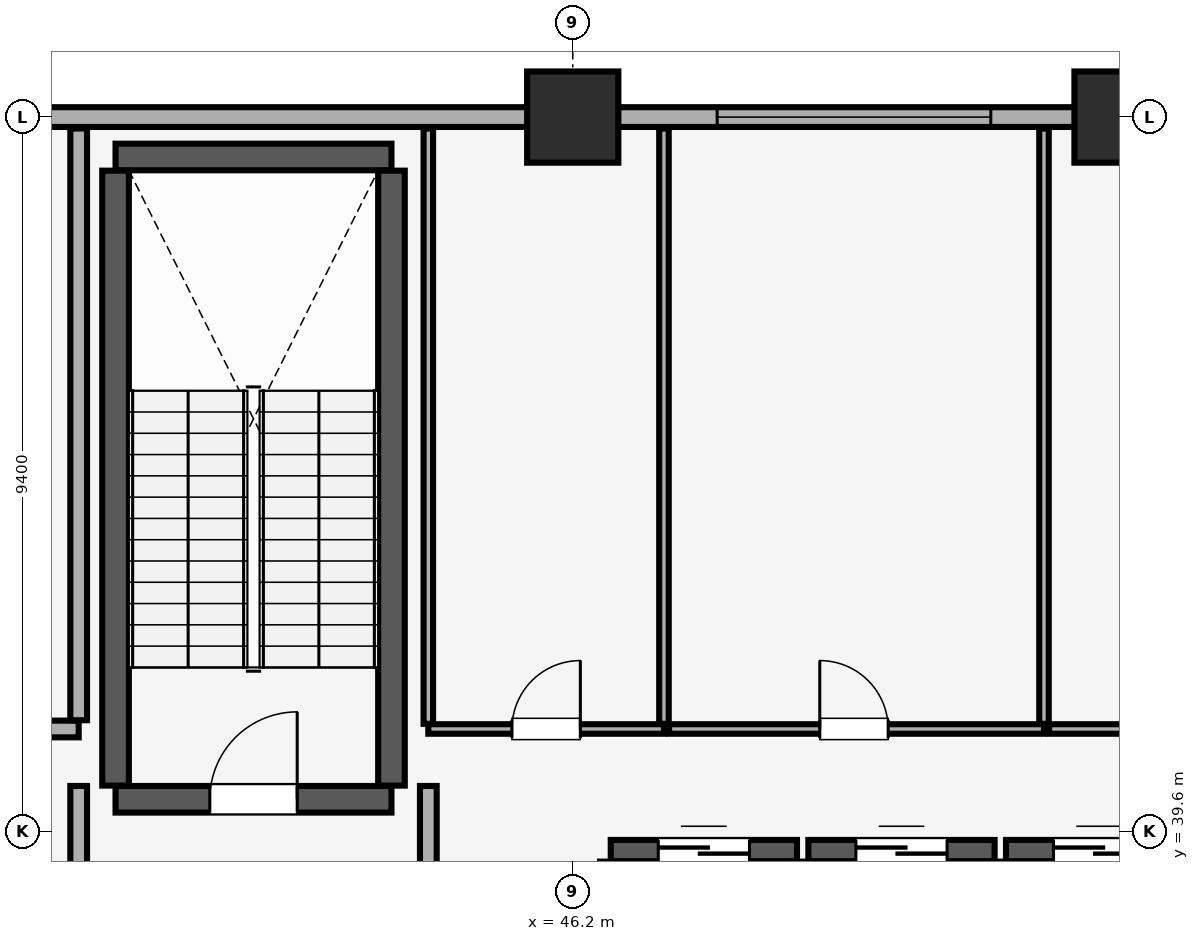
"""IFC4 building model, lengths in metres.
Left out: names, types, materials, properties, quantities, classifications, styles, units other than length and angle.
Written with IfcOpenShell. Run it as: python <this file> out.ifc"""

import sys

from ifc_helpers import new_model, si_unit, direction, frame, frame_2d, origin, origin_2d, place, context, subcontext, project, spatial, rectangle, extrude, element, fill, save


model = new_model("IFC4")
c1 = context("Model", 3, precision=1e-05, world=origin(), true_north=direction((0.0, 1.0)))
c2 = subcontext(c1, "Body", "Model", "MODEL_VIEW")
j1 = project(units=[si_unit("LENGTHUNIT", "METRE"), si_unit("PLANEANGLEUNIT", "RADIAN")], contexts=[c1])
p1 = place(None, origin())
s1 = spatial("IfcSite", under=j1, at=p1, CompositionType="ELEMENT")
p2 = place(p1, origin())
s2 = spatial("IfcBuilding", under=s1, at=p2, CompositionType="ELEMENT")
p3 = place(p2, frame((0.0, 0.0, 130.55)))
s3 = spatial("IfcBuildingStorey", under=s2, at=p3, CompositionType="ELEMENT", Elevation=130.55)
for number, where, z_axis, x_axis in (
    (1, (46.2, 49.0, 0.0), (0.0, 0.0, 1.0), (1.0, 0.0, 0.0)),
    (2, (53.4, 49.0, 0.0), (0.0, 0.0, 1.0), (1.0, 0.0, 0.0)),
):
    element("IfcColumn", number, at=place(p3, frame(where, z_axis=z_axis, x_axis=x_axis)), inside=s3, PredefinedType="COLUMN", context=c2, shape_type="SweptSolid", body=[
        extrude(rectangle(XDim=1.2, YDim=1.2, at=origin_2d()), origin(), (0.0, 0.0, 1.0), 4.56),
    ])
p4 = place(p3, frame((79.8, 49.0, 0.0), z_axis=(0.0, 0.0, 1.0), x_axis=(-1.0, 0.0, 0.0)))
e3 = element("IfcWall", 3, at=p4, inside=s3, PredefinedType="SOLIDWALL", context=c2, shape_type="SweptSolid", body=[
    extrude(rectangle(XDim=75.6, YDim=0.26, at=frame_2d((37.8, 0.0))), origin(), (0.0, 0.0, 1.0), 3.4),
])
p5 = place(p4, frame((71.815, 0.0, 0.85)))
e4 = element("IfcOpeningElement", 4, at=p5, cuts=e3, PredefinedType="OPENING", context=c2, shape_type="SweptSolid", body=[
    extrude(rectangle(XDim=3.0, YDim=1.5, at=frame_2d((1.5, 0.75))), frame((0.0, 0.14, 0.0), z_axis=(0.0, -1.0, 0.0), x_axis=(1.0, 0.0, 0.0)), (0.0, 0.0, 1.0), 0.28),
])
p6 = place(p4, frame((65.775, 0.0, 0.85)))
e5 = element("IfcOpeningElement", 5, at=p6, cuts=e3, PredefinedType="OPENING", context=c2, shape_type="SweptSolid", body=[
    extrude(rectangle(XDim=3.0, YDim=1.5, at=frame_2d((1.5, 0.75))), frame((0.0, 0.14, 0.0), z_axis=(0.0, -1.0, 0.0), x_axis=(1.0, 0.0, 0.0)), (0.0, 0.0, 1.0), 0.28),
])
p7 = place(p4, frame((6.825, 0.0, 0.85)))
e6 = element("IfcOpeningElement", 6, at=p7, cuts=e3, PredefinedType="OPENING", context=c2, shape_type="SweptSolid", body=[
    extrude(rectangle(XDim=3.0, YDim=1.5, at=frame_2d((1.5, 0.75))), frame((0.0, 0.14, 0.0), z_axis=(0.0, -1.0, 0.0), x_axis=(1.0, 0.0, 0.0)), (0.0, 0.0, 1.0), 0.28),
])
p8 = place(p4, frame((0.785, 0.0, 0.85)))
e7 = element("IfcOpeningElement", 7, at=p8, cuts=e3, PredefinedType="OPENING", context=c2, shape_type="SweptSolid", body=[
    extrude(rectangle(XDim=3.0, YDim=1.5, at=frame_2d((1.5, 0.75))), frame((0.0, 0.14, 0.0), z_axis=(0.0, -1.0, 0.0), x_axis=(1.0, 0.0, 0.0)), (0.0, 0.0, 1.0), 0.28),
])
p9 = place(p4, frame((50.315, 0.0, 0.9)))
e8 = element("IfcOpeningElement", 8, at=p9, cuts=e3, PredefinedType="OPENING", context=c2, shape_type="SweptSolid", body=[
    extrude(rectangle(XDim=3.6, YDim=1.5, at=frame_2d((1.8, 0.75))), frame((0.0, 0.14, 0.0), z_axis=(0.0, -1.0, 0.0), x_axis=(1.0, 0.0, 0.0)), (0.0, 0.0, 1.0), 0.28),
])
p10 = place(p4, frame((45.25, 0.0, 0.9)))
e9 = element("IfcOpeningElement", 9, at=p10, cuts=e3, PredefinedType="OPENING", context=c2, shape_type="SweptSolid", body=[
    extrude(rectangle(XDim=3.0, YDim=1.5, at=frame_2d((1.5, 0.75))), frame((0.0, 0.14, 0.0), z_axis=(0.0, -1.0, 0.0), x_axis=(1.0, 0.0, 0.0)), (0.0, 0.0, 1.0), 0.28),
])
p11 = place(p4, frame((28.1, 0.0, 0.9)))
e10 = element("IfcOpeningElement", 10, at=p11, cuts=e3, PredefinedType="OPENING", context=c2, shape_type="SweptSolid", body=[
    extrude(rectangle(XDim=3.6, YDim=1.5, at=frame_2d((1.8, 0.75))), frame((0.0, 0.14, 0.0), z_axis=(0.0, -1.0, 0.0), x_axis=(1.0, 0.0, 0.0)), (0.0, 0.0, 1.0), 0.28),
])
p12 = place(p4, frame((23.035, 0.0, 0.9)))
e11 = element("IfcOpeningElement", 11, at=p12, cuts=e3, PredefinedType="OPENING", context=c2, shape_type="SweptSolid", body=[
    extrude(rectangle(XDim=2.4, YDim=1.5, at=frame_2d((1.2, 0.75))), frame((0.0, 0.14, 0.0), z_axis=(0.0, -1.0, 0.0), x_axis=(1.0, 0.0, 0.0)), (0.0, 0.0, 1.0), 0.28),
])
p13 = place(p3, frame((40.185, 40.025, 0.0), z_axis=(0.0, 0.0, 1.0), x_axis=(1.0, 0.0, 0.0)))
e12 = element("IfcWall", 12, at=p13, inside=s3, PredefinedType="SHEAR", context=c2, shape_type="SweptSolid", body=[
    extrude(rectangle(XDim=3.63, YDim=0.35, at=frame_2d((1.815, 0.0))), origin(), (0.0, 0.0, 1.0), 4.52),
])
p14 = place(p13, frame((1.24, 0.0, 0.0)))
e13 = element("IfcOpeningElement", 13, at=p14, cuts=e12, PredefinedType="OPENING", context=c2, shape_type="SweptSolid", body=[
    extrude(rectangle(XDim=1.15, YDim=2.15, at=frame_2d((0.575, 1.075))), frame((0.0, 0.185, 0.0), z_axis=(0.0, -1.0, 0.0), x_axis=(1.0, 0.0, 0.0)), (0.0, 0.0, 1.0), 0.37),
])
p15 = place(p3, frame((40.185, 48.475, 0.0), z_axis=(0.0, 0.0, 1.0), x_axis=(1.0, 0.0, 0.0)))
e14 = element("IfcWall", 14, at=p15, inside=s3, PredefinedType="SHEAR", context=c2, shape_type="SweptSolid", body=[
    extrude(rectangle(XDim=3.63, YDim=0.35, at=frame_2d((1.815, 0.0))), origin(), (0.0, 0.0, 1.0), 4.52),
])
for number, where, z_axis, x_axis in (
    (15, (40.185, 40.205, 0.0), (0.0, 0.0, 1.0), (0.0, 1.0, 0.0)),
    (16, (43.815, 40.205, 0.0), (0.0, 0.0, 1.0), (0.0, 1.0, 0.0)),
):
    element("IfcWall", number, at=place(p3, frame(where, z_axis=z_axis, x_axis=x_axis)), inside=s3, PredefinedType="SHEAR", context=c2, shape_type="SweptSolid", body=[
        extrude(rectangle(XDim=8.09, YDim=0.35, at=frame_2d((4.045, 0.0))), origin(), (0.0, 0.0, 1.0), 4.52),
    ])
p16 = place(p3, frame((46.7, 39.35, 0.0), z_axis=(0.0, 0.0, 1.0), x_axis=(1.0, 0.0, 0.0)))
e17 = element("IfcWall", 17, at=p16, inside=s3, PredefinedType="SHEAR", context=c2, shape_type="SweptSolid", body=[
    extrude(rectangle(XDim=2.45, YDim=0.28, at=frame_2d((1.225, 0.0))), origin(), (0.0, 0.0, 1.0), 4.52),
])
p17 = place(p16, frame((0.625, 0.0, 0.0)))
e18 = element("IfcOpeningElement", 18, at=p17, cuts=e17, PredefinedType="OPENING", context=c2, shape_type="SweptSolid", body=[
    extrude(rectangle(XDim=1.2, YDim=2.25, at=frame_2d((0.6, 1.125))), frame((0.0, 0.15, 0.0), z_axis=(0.0, -1.0, 0.0), x_axis=(1.0, 0.0, 0.0)), (0.0, 0.0, 1.0), 0.3),
])
for number, where, z_axis, x_axis in (
    (19, (46.7, 37.145, 0.0), (0.0, 0.0, 1.0), (0.0, 1.0, 0.0)),
    (20, (49.15, 37.145, 0.0), (0.0, 0.0, 1.0), (0.0, 1.0, 0.0)),
):
    element("IfcWall", number, at=place(p3, frame(where, z_axis=z_axis, x_axis=x_axis)), inside=s3, PredefinedType="SHEAR", context=c2, shape_type="SweptSolid", body=[
        extrude(rectangle(XDim=2.06, YDim=0.28, at=frame_2d((1.03, 0.0))), origin(), (0.0, 0.0, 1.0), 4.52),
    ])
p18 = place(p3, frame((49.3, 39.35, 0.0), z_axis=(0.0, 0.0, 1.0), x_axis=(1.0, 0.0, 0.0)))
e21 = element("IfcWall", 21, at=p18, inside=s3, PredefinedType="SHEAR", context=c2, shape_type="SweptSolid", body=[
    extrude(rectangle(XDim=2.45, YDim=0.28, at=frame_2d((1.225, 0.0))), origin(), (0.0, 0.0, 1.0), 4.52),
])
p19 = place(p18, frame((0.625, 0.0, 0.0)))
e22 = element("IfcOpeningElement", 22, at=p19, cuts=e21, PredefinedType="OPENING", context=c2, shape_type="SweptSolid", body=[
    extrude(rectangle(XDim=1.2, YDim=2.25, at=frame_2d((0.6, 1.125))), frame((0.0, 0.15, 0.0), z_axis=(0.0, -1.0, 0.0), x_axis=(1.0, 0.0, 0.0)), (0.0, 0.0, 1.0), 0.3),
])
p20 = place(p3, frame((51.75, 37.145, 0.0), z_axis=(0.0, 0.0, 1.0), x_axis=(0.0, 1.0, 0.0)))
e23 = element("IfcWall", 23, at=p20, inside=s3, PredefinedType="SHEAR", context=c2, shape_type="SweptSolid", body=[
    extrude(rectangle(XDim=2.06, YDim=0.28, at=frame_2d((1.03, 0.0))), origin(), (0.0, 0.0, 1.0), 4.52),
])
p21 = place(p3, frame((51.9, 39.35, 0.0), z_axis=(0.0, 0.0, 1.0), x_axis=(1.0, 0.0, 0.0)))
e24 = element("IfcWall", 24, at=p21, inside=s3, PredefinedType="SHEAR", context=c2, shape_type="SweptSolid", body=[
    extrude(rectangle(XDim=2.59, YDim=0.28, at=frame_2d((1.295, 0.0))), origin(), (0.0, 0.0, 1.0), 4.52),
])
p22 = place(p21, frame((0.625, 0.0, 0.0)))
e25 = element("IfcOpeningElement", 25, at=p22, cuts=e24, PredefinedType="OPENING", context=c2, shape_type="SweptSolid", body=[
    extrude(rectangle(XDim=1.2, YDim=2.25, at=frame_2d((0.6, 1.125))), frame((0.0, 0.15, 0.0), z_axis=(0.0, -1.0, 0.0), x_axis=(1.0, 0.0, 0.0)), (0.0, 0.0, 1.0), 0.3),
])
for number, where, z_axis, x_axis in (
    (26, (39.7, 34.415, 0.0), (0.0, 0.0, 1.0), (0.0, 1.0, 0.0)),
    (27, (44.3, 34.415, 0.0), (0.0, 0.0, 1.0), (0.0, 1.0, 0.0)),
):
    element("IfcWall", number, at=place(p3, frame(where, z_axis=z_axis, x_axis=x_axis)), inside=s3, PredefinedType="PARTITIONING", context=c2, shape_type="SweptSolid", body=[
        extrude(rectangle(XDim=5.785, YDim=0.22, at=frame_2d((2.893, 0.0))), origin(), (0.0, 0.0, 1.0), 4.52),
    ])
p23 = place(p3, frame((35.18, 40.95, 0.0), z_axis=(0.0, 0.0, 1.0), x_axis=(1.0, 0.0, 0.0)))
e28 = element("IfcWall", 28, at=p23, inside=s3, PredefinedType="PARTITIONING", context=c2, shape_type="SweptSolid", body=[
    extrude(rectangle(XDim=4.52, YDim=0.22, at=frame_2d((2.26, 0.0))), origin(), (0.0, 0.0, 1.0), 4.52),
])
p24 = place(p23, frame((0.795, 0.0, 0.0)))
e29 = element("IfcOpeningElement", 29, at=p24, cuts=e28, PredefinedType="OPENING", context=c2, shape_type="SweptSolid", body=[
    extrude(rectangle(XDim=0.85, YDim=2.1, at=frame_2d((0.425, 1.05))), frame((0.0, 0.12, 0.0), z_axis=(0.0, -1.0, 0.0), x_axis=(1.0, 0.0, 0.0)), (0.0, 0.0, 1.0), 0.24),
])
p25 = place(p3, frame((39.7, 41.065, 0.0), z_axis=(0.0, 0.0, 1.0), x_axis=(0.0, 1.0, 0.0)))
e30 = element("IfcWall", 30, at=p25, inside=s3, PredefinedType="PARTITIONING", context=c2, shape_type="SweptSolid", body=[
    extrude(rectangle(XDim=7.785, YDim=0.22, at=frame_2d((3.893, 0.0))), origin(), (0.0, 0.0, 1.0), 4.52),
])
p26 = place(p3, frame((44.3, 40.95, 0.0), z_axis=(0.0, 0.0, 1.0), x_axis=(1.0, 0.0, 0.0)))
e31 = element("IfcWall", 31, at=p26, inside=s3, PredefinedType="PARTITIONING", context=c2, shape_type="SweptSolid", body=[
    extrude(rectangle(XDim=3.1, YDim=0.125, at=frame_2d((1.55, 0.0))), origin(), (0.0, 0.0, 1.0), 4.52),
])
p27 = place(p26, frame((1.1, 0.0, 0.0)))
e32 = element("IfcOpeningElement", 32, at=p27, cuts=e31, PredefinedType="OPENING", context=c2, shape_type="SweptSolid", body=[
    extrude(rectangle(XDim=0.9, YDim=2.1, at=frame_2d((0.45, 1.05))), frame((0.0, 0.073, 0.0), z_axis=(0.0, -1.0, 0.0), x_axis=(1.0, 0.0, 0.0)), (0.0, 0.0, 1.0), 0.145),
])
for number, where, z_axis, x_axis in (
    (33, (44.3, 41.018, 0.0), (0.0, 0.0, 1.0), (0.0, 1.0, 0.0)),
    (34, (47.4, 41.018, 0.0), (0.0, 0.0, 1.0), (0.0, 1.0, 0.0)),
):
    element("IfcWall", number, at=place(p3, frame(where, z_axis=z_axis, x_axis=x_axis)), inside=s3, PredefinedType="PARTITIONING", context=c2, shape_type="SweptSolid", body=[
        extrude(rectangle(XDim=7.833, YDim=0.125, at=frame_2d((3.916, 0.0))), origin(), (0.0, 0.0, 1.0), 4.52),
    ])
p28 = place(p3, frame((47.468, 40.95, 0.0), z_axis=(0.0, 0.0, 1.0), x_axis=(1.0, 0.0, 0.0)))
e35 = element("IfcWall", 35, at=p28, inside=s3, PredefinedType="PARTITIONING", context=c2, shape_type="SweptSolid", body=[
    extrude(rectangle(XDim=4.932, YDim=0.125, at=frame_2d((2.466, 0.0))), origin(), (0.0, 0.0, 1.0), 4.52),
])
p29 = place(p28, frame((1.982, 0.0, 0.0)))
e36 = element("IfcOpeningElement", 36, at=p29, cuts=e35, PredefinedType="OPENING", context=c2, shape_type="SweptSolid", body=[
    extrude(rectangle(XDim=0.9, YDim=2.1, at=frame_2d((0.45, 1.05))), frame((0.0, 0.073, 0.0), z_axis=(0.0, -1.0, 0.0), x_axis=(1.0, 0.0, 0.0)), (0.0, 0.0, 1.0), 0.145),
])
p30 = place(p3, frame((52.4, 41.018, 0.0), z_axis=(0.0, 0.0, 1.0), x_axis=(0.0, 1.0, 0.0)))
e37 = element("IfcWall", 37, at=p30, inside=s3, PredefinedType="PARTITIONING", context=c2, shape_type="SweptSolid", body=[
    extrude(rectangle(XDim=7.833, YDim=0.125, at=frame_2d((3.916, 0.0))), origin(), (0.0, 0.0, 1.0), 4.52),
])
p31 = place(p3, frame((52.468, 40.95, 0.0), z_axis=(0.0, 0.0, 1.0), x_axis=(1.0, 0.0, 0.0)))
e38 = element("IfcWall", 38, at=p31, inside=s3, PredefinedType="PARTITIONING", context=c2, shape_type="SweptSolid", body=[
    extrude(rectangle(XDim=5.032, YDim=0.125, at=frame_2d((2.516, 0.0))), origin(), (0.0, 0.0, 1.0), 4.52),
])
p32 = place(p31, frame((2.032, 0.0, 0.0)))
e39 = element("IfcOpeningElement", 39, at=p32, cuts=e38, PredefinedType="OPENING", context=c2, shape_type="SweptSolid", body=[
    extrude(rectangle(XDim=0.9, YDim=2.1, at=frame_2d((0.45, 1.05))), frame((0.0, 0.073, 0.0), z_axis=(0.0, -1.0, 0.0), x_axis=(1.0, 0.0, 0.0)), (0.0, 0.0, 1.0), 0.145),
])
p33 = place(p11, origin())
e40 = element("IfcWindow", 40, at=p33, inside=s3, PartitioningType="SINGLE_PANEL", PredefinedType="WINDOW", context=c2, shape_type="SweptSolid", body=[
    extrude(rectangle(XDim=3.6, YDim=1.5, at=frame_2d((1.8, 0.75))), frame((0.0, 0.03, 0.0), z_axis=(0.0, -1.0, 0.0), x_axis=(1.0, 0.0, 0.0)), (0.0, 0.0, 1.0), 0.06),
])
fill(e10, e40)
p34 = place(p14, origin())
e41 = element("IfcDoor", 41, at=p34, inside=s3, OperationType="SINGLE_SWING_RIGHT", PredefinedType="DOOR", context=c2, shape_type="SweptSolid", body=[
    extrude(rectangle(XDim=1.15, YDim=2.15, at=frame_2d((0.575, 1.075))), frame((0.0, 0.025, 0.0), z_axis=(0.0, -1.0, 0.0), x_axis=(1.0, 0.0, 0.0)), (0.0, 0.0, 1.0), 0.05),
])
fill(e13, e41)
p35 = place(p17, origin())
e42 = element("IfcDoor", 42, at=p35, inside=s3, OperationType="DOUBLE_DOOR_SLIDING", PredefinedType="DOOR", context=c2, shape_type="SweptSolid", body=[
    extrude(rectangle(XDim=1.2, YDim=2.25, at=frame_2d((0.6, 1.125))), frame((0.0, 0.025, 0.0), z_axis=(0.0, -1.0, 0.0), x_axis=(1.0, 0.0, 0.0)), (0.0, 0.0, 1.0), 0.05),
])
fill(e18, e42)
p36 = place(p19, origin())
e43 = element("IfcDoor", 43, at=p36, inside=s3, OperationType="DOUBLE_DOOR_SLIDING", PredefinedType="DOOR", context=c2, shape_type="SweptSolid", body=[
    extrude(rectangle(XDim=1.2, YDim=2.25, at=frame_2d((0.6, 1.125))), frame((0.0, 0.025, 0.0), z_axis=(0.0, -1.0, 0.0), x_axis=(1.0, 0.0, 0.0)), (0.0, 0.0, 1.0), 0.05),
])
fill(e22, e43)
p37 = place(p22, origin())
e44 = element("IfcDoor", 44, at=p37, inside=s3, OperationType="DOUBLE_DOOR_SLIDING", PredefinedType="DOOR", context=c2, shape_type="SweptSolid", body=[
    extrude(rectangle(XDim=1.2, YDim=2.25, at=frame_2d((0.6, 1.125))), frame((0.0, 0.025, 0.0), z_axis=(0.0, -1.0, 0.0), x_axis=(1.0, 0.0, 0.0)), (0.0, 0.0, 1.0), 0.05),
])
fill(e25, e44)
p38 = place(p27, origin())
e45 = element("IfcDoor", 45, at=p38, inside=s3, OperationType="SINGLE_SWING_RIGHT", PredefinedType="DOOR", context=c2, shape_type="SweptSolid", body=[
    extrude(rectangle(XDim=0.9, YDim=2.1, at=frame_2d((0.45, 1.05))), frame((0.0, 0.025, 0.0), z_axis=(0.0, -1.0, 0.0), x_axis=(1.0, 0.0, 0.0)), (0.0, 0.0, 1.0), 0.05),
])
fill(e32, e45)
p39 = place(p29, origin())
e46 = element("IfcDoor", 46, at=p39, inside=s3, OperationType="SINGLE_SWING_LEFT", PredefinedType="DOOR", context=c2, shape_type="SweptSolid", body=[
    extrude(rectangle(XDim=0.9, YDim=2.1, at=frame_2d((0.45, 1.05))), frame((0.0, 0.025, 0.0), z_axis=(0.0, -1.0, 0.0), x_axis=(1.0, 0.0, 0.0)), (0.0, 0.0, 1.0), 0.05),
])
fill(e36, e46)
save(model, sys.argv[1])
